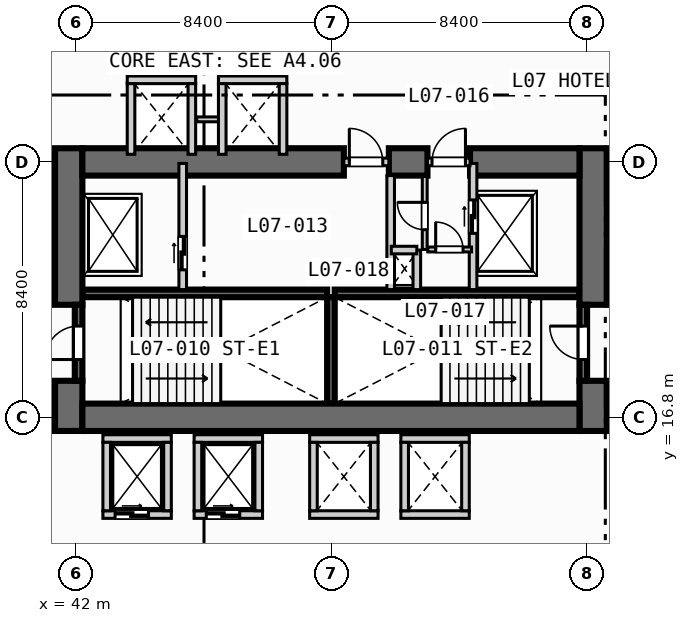
"""IFC4 building model, lengths in metres.
Left out: names, types, materials, properties, quantities, classifications, styles, units other than length and angle.
Written with IfcOpenShell. Run it as: python <this file> out.ifc"""

import sys

from ifc_helpers import new_model, si_unit, direction, frame, frame_2d, origin, place, context, subcontext, project, spatial, rectangle, extrude, element, fill, save


model = new_model("IFC4")
c1 = context("Model", 3, precision=1e-05, world=origin(), true_north=direction((0.0, 1.0)))
c2 = subcontext(c1, "Body", "Model", "MODEL_VIEW")
j1 = project(units=[si_unit("LENGTHUNIT", "METRE"), si_unit("PLANEANGLEUNIT", "RADIAN")], contexts=[c1])
p1 = place(None, origin())
s1 = spatial("IfcSite", under=j1, at=p1, CompositionType="ELEMENT")
p2 = place(p1, origin())
s2 = spatial("IfcBuilding", under=s1, at=p2, CompositionType="ELEMENT")
p3 = place(p2, frame((0.0, 0.0, 35.8)))
s3 = spatial("IfcBuildingStorey", under=s2, at=p3, CompositionType="ELEMENT", Elevation=35.8)
for number, where, z_axis, x_axis in (
    (1, (42.2, 20.875, 0.0), (0.0, 0.0, 1.0), (1.0, 0.0, 0.0)),
    (2, (50.5, 20.875, 0.0), (0.0, 0.0, 1.0), (1.0, 0.0, 0.0)),
):
    element("IfcWall", number, at=place(p3, frame(where, z_axis=z_axis, x_axis=x_axis)), inside=s3, PredefinedType="SOLIDWALL", context=c2, shape_type="SweptSolid", body=[
        extrude(rectangle(XDim=8.05, YDim=0.25, at=frame_2d((4.025, 0.0))), origin(), (0.0, 0.0, 1.0), 3.55),
    ])
p4 = place(p3, frame((50.375, 17.25, 0.0), z_axis=(0.0, 0.0, 1.0), x_axis=(0.0, 1.0, 0.0)))
e3 = element("IfcWall", 3, at=p4, inside=s3, PredefinedType="SOLIDWALL", context=c2, shape_type="SweptSolid", body=[
    extrude(rectangle(XDim=3.5, YDim=0.25, at=frame_2d((1.75, 0.0))), origin(), (0.0, 0.0, 1.0), 3.55),
])
p5 = place(p3, frame((41.75, 16.35, 0.0), z_axis=(0.0, 0.0, 1.0), x_axis=(0.0, 1.0, 0.0)))
e4 = element("IfcWall", 4, at=p5, inside=s3, PredefinedType="SHEAR", context=c2, shape_type="SweptSolid", body=[
    extrude(rectangle(XDim=1.65, YDim=0.9, at=frame_2d((0.825, 0.0))), origin(), (0.0, 0.0, 1.0), 3.55),
])
p6 = place(p3, frame((41.75, 20.5, 0.0), z_axis=(0.0, 0.0, 1.0), x_axis=(0.0, 1.0, 0.0)))
e5 = element("IfcWall", 5, at=p6, inside=s3, PredefinedType="SHEAR", context=c2, shape_type="SweptSolid", body=[
    extrude(rectangle(XDim=5.15, YDim=0.9, at=frame_2d((2.575, 0.0))), origin(), (0.0, 0.0, 1.0), 3.55),
])
p7 = place(p3, frame((59.0, 16.35, 0.0), z_axis=(0.0, 0.0, 1.0), x_axis=(0.0, 1.0, 0.0)))
e6 = element("IfcWall", 6, at=p7, inside=s3, PredefinedType="SHEAR", context=c2, shape_type="SweptSolid", body=[
    extrude(rectangle(XDim=1.65, YDim=0.9, at=frame_2d((0.825, 0.0))), origin(), (0.0, 0.0, 1.0), 3.55),
])
p8 = place(p3, frame((59.0, 20.5, 0.0), z_axis=(0.0, 0.0, 1.0), x_axis=(0.0, 1.0, 0.0)))
e7 = element("IfcWall", 7, at=p8, inside=s3, PredefinedType="SHEAR", context=c2, shape_type="SweptSolid", body=[
    extrude(rectangle(XDim=5.15, YDim=0.9, at=frame_2d((2.575, 0.0))), origin(), (0.0, 0.0, 1.0), 3.55),
])
p9 = place(p3, frame((42.2, 16.8, 0.0), z_axis=(0.0, 0.0, 1.0), x_axis=(1.0, 0.0, 0.0)))
e8 = element("IfcWall", 8, at=p9, inside=s3, PredefinedType="SHEAR", context=c2, shape_type="SweptSolid", body=[
    extrude(rectangle(XDim=16.35, YDim=0.9, at=frame_2d((8.175, 0.0))), origin(), (0.0, 0.0, 1.0), 3.55),
])
p10 = place(p3, frame((42.2, 25.2, 0.0), z_axis=(0.0, 0.0, 1.0), x_axis=(1.0, 0.0, 0.0)))
e9 = element("IfcWall", 9, at=p10, inside=s3, PredefinedType="SHEAR", context=c2, shape_type="SweptSolid", body=[
    extrude(rectangle(XDim=8.6, YDim=0.9, at=frame_2d((4.3, 0.0))), origin(), (0.0, 0.0, 1.0), 3.55),
])
p11 = place(p3, frame((52.28, 25.2, 0.0), z_axis=(0.0, 0.0, 1.0), x_axis=(1.0, 0.0, 0.0)))
e10 = element("IfcWall", 10, at=p11, inside=s3, PredefinedType="SHEAR", context=c2, shape_type="SweptSolid", body=[
    extrude(rectangle(XDim=1.27, YDim=0.9, at=frame_2d((0.635, 0.0))), origin(), (0.0, 0.0, 1.0), 3.55),
])
p12 = place(p3, frame((54.95, 25.2, 0.0), z_axis=(0.0, 0.0, 1.0), x_axis=(1.0, 0.0, 0.0)))
e11 = element("IfcWall", 11, at=p12, inside=s3, PredefinedType="SHEAR", context=c2, shape_type="SweptSolid", body=[
    extrude(rectangle(XDim=3.6, YDim=0.9, at=frame_2d((1.8, 0.0))), origin(), (0.0, 0.0, 1.0), 3.55),
])
p13 = place(p3, frame((42.075, 18.0, 0.0), z_axis=(0.0, 0.0, 1.0), x_axis=(0.0, 1.0, 0.0)))
e12 = element("IfcWall", 12, at=p13, inside=s3, PredefinedType="SOLIDWALL", context=c2, shape_type="SweptSolid", body=[
    extrude(rectangle(XDim=2.5, YDim=0.25, at=frame_2d((1.25, 0.0))), origin(), (0.0, 0.0, 1.0), 3.55),
])
p14 = place(p13, frame((0.7, 0.0, 0.0)))
e13 = element("IfcOpeningElement", 13, at=p14, cuts=e12, PredefinedType="OPENING", context=c2, shape_type="SweptSolid", body=[
    extrude(rectangle(XDim=1.1, YDim=2.15, at=frame_2d((0.55, 1.075))), frame((0.0, 0.135, 0.0), z_axis=(0.0, -1.0, 0.0), x_axis=(1.0, 0.0, 0.0)), (0.0, 0.0, 1.0), 0.27),
])
p15 = place(p3, frame((58.675, 18.0, 0.0), z_axis=(0.0, 0.0, 1.0), x_axis=(0.0, 1.0, 0.0)))
e14 = element("IfcWall", 14, at=p15, inside=s3, PredefinedType="SOLIDWALL", context=c2, shape_type="SweptSolid", body=[
    extrude(rectangle(XDim=2.5, YDim=0.25, at=frame_2d((1.25, 0.0))), origin(), (0.0, 0.0, 1.0), 3.55),
])
p16 = place(p15, frame((0.7, 0.0, 0.0)))
e15 = element("IfcOpeningElement", 15, at=p16, cuts=e14, PredefinedType="OPENING", context=c2, shape_type="SweptSolid", body=[
    extrude(rectangle(XDim=1.1, YDim=2.15, at=frame_2d((0.55, 1.075))), frame((0.0, 0.135, 0.0), z_axis=(0.0, -1.0, 0.0), x_axis=(1.0, 0.0, 0.0)), (0.0, 0.0, 1.0), 0.27),
])
p17 = place(p3, frame((45.5, 21.0, 0.0), z_axis=(0.0, 0.0, 1.0), x_axis=(0.0, 1.0, 0.0)))
e16 = element("IfcWall", 16, at=p17, inside=s3, PredefinedType="SOLIDWALL", context=c2, shape_type="SweptSolid", body=[
    extrude(rectangle(XDim=4.15, YDim=0.25, at=frame_2d((2.075, 0.0))), origin(), (0.0, 0.0, 1.0), 3.55),
])
p18 = place(p17, frame((0.65, 0.0, 0.0)))
e17 = element("IfcOpeningElement", 17, at=p18, cuts=e16, PredefinedType="OPENING", context=c2, shape_type="SweptSolid", body=[
    extrude(rectangle(XDim=1.1, YDim=2.15, at=frame_2d((0.55, 1.075))), frame((0.0, 0.135, 0.0), z_axis=(0.0, -1.0, 0.0), x_axis=(1.0, 0.0, 0.0)), (0.0, 0.0, 1.0), 0.27),
])
p19 = place(p3, frame((50.8, 25.2, 0.0), z_axis=(0.0, 0.0, 1.0), x_axis=(1.0, 0.0, 0.0)))
e18 = element("IfcWall", 18, at=p19, inside=s3, PredefinedType="SOLIDWALL", context=c2, shape_type="SweptSolid", body=[
    extrude(rectangle(XDim=1.48, YDim=0.25, at=frame_2d((0.74, 0.0))), origin(), (0.0, 0.0, 1.0), 3.55),
])
p20 = place(p19, frame((0.18, 0.0, 0.0)))
e19 = element("IfcOpeningElement", 19, at=p20, cuts=e18, PredefinedType="OPENING", context=c2, shape_type="SweptSolid", body=[
    extrude(rectangle(XDim=1.1, YDim=2.15, at=frame_2d((0.55, 1.075))), frame((0.0, 0.135, 0.0), z_axis=(0.0, -1.0, 0.0), x_axis=(1.0, 0.0, 0.0)), (0.0, 0.0, 1.0), 0.27),
])
p21 = place(p3, frame((52.34, 21.0, 0.0), z_axis=(0.0, 0.0, 1.0), x_axis=(0.0, 1.0, 0.0)))
e20 = element("IfcWall", 20, at=p21, inside=s3, PredefinedType="SOLIDWALL", context=c2, shape_type="SweptSolid", body=[
    extrude(rectangle(XDim=3.75, YDim=0.25, at=frame_2d((1.875, 0.0))), origin(), (0.0, 0.0, 1.0), 3.55),
])
p22 = place(p3, frame((55.05, 21.0, 0.0), z_axis=(0.0, 0.0, 1.0), x_axis=(0.0, 1.0, 0.0)))
e21 = element("IfcWall", 21, at=p22, inside=s3, PredefinedType="SOLIDWALL", context=c2, shape_type="SweptSolid", body=[
    extrude(rectangle(XDim=4.15, YDim=0.25, at=frame_2d((2.075, 0.0))), origin(), (0.0, 0.0, 1.0), 3.55),
])
p23 = place(p22, frame((1.85, 0.0, 0.0)))
e22 = element("IfcOpeningElement", 22, at=p23, cuts=e21, PredefinedType="OPENING", context=c2, shape_type="SweptSolid", body=[
    extrude(rectangle(XDim=1.1, YDim=2.15, at=frame_2d((0.55, 1.075))), frame((0.0, 0.135, 0.0), z_axis=(0.0, -1.0, 0.0), x_axis=(1.0, 0.0, 0.0)), (0.0, 0.0, 1.0), 0.27),
])
p24 = place(p3, frame((53.55, 25.2, 0.0), z_axis=(0.0, 0.0, 1.0), x_axis=(1.0, 0.0, 0.0)))
e23 = element("IfcWall", 23, at=p24, inside=s3, PredefinedType="SOLIDWALL", context=c2, shape_type="SweptSolid", body=[
    extrude(rectangle(XDim=1.4, YDim=0.25, at=frame_2d((0.7, 0.0))), origin(), (0.0, 0.0, 1.0), 3.55),
])
p25 = place(p24, frame((0.15, 0.0, 0.0)))
e24 = element("IfcOpeningElement", 24, at=p25, cuts=e23, PredefinedType="OPENING", context=c2, shape_type="SweptSolid", body=[
    extrude(rectangle(XDim=1.1, YDim=2.15, at=frame_2d((0.55, 1.075))), frame((0.0, 0.135, 0.0), z_axis=(0.0, -1.0, 0.0), x_axis=(1.0, 0.0, 0.0)), (0.0, 0.0, 1.0), 0.27),
])
p26 = place(p3, frame((53.2, 21.0, 0.0), z_axis=(0.0, 0.0, 1.0), x_axis=(0.0, 1.0, 0.0)))
e25 = element("IfcWall", 25, at=p26, inside=s3, PredefinedType="SOLIDWALL", context=c2, shape_type="SweptSolid", body=[
    extrude(rectangle(XDim=1.3, YDim=0.25, at=frame_2d((0.65, 0.0))), origin(), (0.0, 0.0, 1.0), 3.55),
])
p27 = place(p3, frame((52.36, 22.3, 0.0), z_axis=(0.0, 0.0, 1.0), x_axis=(1.0, 0.0, 0.0)))
e26 = element("IfcWall", 26, at=p27, inside=s3, PredefinedType="SOLIDWALL", context=c2, shape_type="SweptSolid", body=[
    extrude(rectangle(XDim=0.84, YDim=0.25, at=frame_2d((0.42, 0.0))), origin(), (0.0, 0.0, 1.0), 3.55),
])
p28 = place(p3, frame((53.56, 22.32, 0.0), z_axis=(0.0, 0.0, 1.0), x_axis=(1.0, 0.0, 0.0)))
e27 = element("IfcWall", 27, at=p28, inside=s3, PredefinedType="PARTITIONING", context=c2, shape_type="SweptSolid", body=[
    extrude(rectangle(XDim=1.44, YDim=0.16, at=frame_2d((0.72, 0.0))), origin(), (0.0, 0.0, 1.0), 3.55),
])
p29 = place(p28, frame((0.26, 0.0, 0.0)))
e28 = element("IfcOpeningElement", 28, at=p29, cuts=e27, PredefinedType="OPENING", context=c2, shape_type="SweptSolid", body=[
    extrude(rectangle(XDim=0.9, YDim=2.1, at=frame_2d((0.45, 1.05))), frame((0.0, 0.09, 0.0), z_axis=(0.0, -1.0, 0.0), x_axis=(1.0, 0.0, 0.0)), (0.0, 0.0, 1.0), 0.18),
])
p30 = place(p3, frame((53.46, 22.32, 0.0), z_axis=(0.0, 0.0, 1.0), x_axis=(0.0, 1.0, 0.0)))
e29 = element("IfcWall", 29, at=p30, inside=s3, PredefinedType="PARTITIONING", context=c2, shape_type="SweptSolid", body=[
    extrude(rectangle(XDim=2.4, YDim=0.16, at=frame_2d((1.2, 0.0))), origin(), (0.0, 0.0, 1.0), 3.55),
])
p31 = place(p30, frame((0.65, 0.0, 0.0)))
e30 = element("IfcOpeningElement", 30, at=p31, cuts=e29, PredefinedType="OPENING", context=c2, shape_type="SweptSolid", body=[
    extrude(rectangle(XDim=0.9, YDim=2.1, at=frame_2d((0.45, 1.05))), frame((0.0, 0.09, 0.0), z_axis=(0.0, -1.0, 0.0), x_axis=(1.0, 0.0, 0.0)), (0.0, 0.0, 1.0), 0.18),
])
p32 = place(p3, frame((42.875, 13.6, 0.0), z_axis=(0.0, 0.0, 1.0), x_axis=(1.0, 0.0, 0.0)))
e31 = element("IfcWall", 31, at=p32, inside=s3, PredefinedType="SOLIDWALL", context=c2, shape_type="SweptSolid", body=[
    extrude(rectangle(XDim=2.25, YDim=0.25, at=frame_2d((1.125, 0.0))), origin(), (0.0, 0.0, 1.0), 3.55),
])
p33 = place(p32, frame((0.4, 0.0, 0.0)))
e32 = element("IfcOpeningElement", 32, at=p33, cuts=e31, PredefinedType="OPENING", context=c2, shape_type="SweptSolid", body=[
    extrude(rectangle(XDim=1.1, YDim=2.15, at=frame_2d((0.55, 1.075))), frame((0.0, 0.135, 0.0), z_axis=(0.0, -1.0, 0.0), x_axis=(1.0, 0.0, 0.0)), (0.0, 0.0, 1.0), 0.27),
])
for number, where, z_axis, x_axis in (
    (33, (42.875, 16.1, 0.0), (0.0, 0.0, 1.0), (1.0, 0.0, 0.0)),
    (34, (43.0, 13.725, 0.0), (0.0, 0.0, 1.0), (0.0, 1.0, 0.0)),
    (35, (45.0, 13.725, 0.0), (0.0, 0.0, 1.0), (0.0, 1.0, 0.0)),
):
    element("IfcWall", number, at=place(p3, frame(where, z_axis=z_axis, x_axis=x_axis)), inside=s3, PredefinedType="SOLIDWALL", context=c2, shape_type="SweptSolid", body=[
        extrude(rectangle(XDim=2.25, YDim=0.25, at=frame_2d((1.125, 0.0))), origin(), (0.0, 0.0, 1.0), 3.55),
    ])
p34 = place(p3, frame((45.875, 13.6, 0.0), z_axis=(0.0, 0.0, 1.0), x_axis=(1.0, 0.0, 0.0)))
e36 = element("IfcWall", 36, at=p34, inside=s3, PredefinedType="SOLIDWALL", context=c2, shape_type="SweptSolid", body=[
    extrude(rectangle(XDim=2.25, YDim=0.25, at=frame_2d((1.125, 0.0))), origin(), (0.0, 0.0, 1.0), 3.55),
])
p35 = place(p34, frame((0.4, 0.0, 0.0)))
e37 = element("IfcOpeningElement", 37, at=p35, cuts=e36, PredefinedType="OPENING", context=c2, shape_type="SweptSolid", body=[
    extrude(rectangle(XDim=1.1, YDim=2.15, at=frame_2d((0.55, 1.075))), frame((0.0, 0.135, 0.0), z_axis=(0.0, -1.0, 0.0), x_axis=(1.0, 0.0, 0.0)), (0.0, 0.0, 1.0), 0.27),
])
for number, where, z_axis, x_axis in (
    (38, (45.875, 16.1, 0.0), (0.0, 0.0, 1.0), (1.0, 0.0, 0.0)),
    (39, (46.0, 13.725, 0.0), (0.0, 0.0, 1.0), (0.0, 1.0, 0.0)),
    (40, (48.0, 13.725, 0.0), (0.0, 0.0, 1.0), (0.0, 1.0, 0.0)),
    (41, (49.675, 13.6, 0.0), (0.0, 0.0, 1.0), (1.0, 0.0, 0.0)),
    (42, (49.675, 16.1, 0.0), (0.0, 0.0, 1.0), (1.0, 0.0, 0.0)),
    (43, (49.8, 13.725, 0.0), (0.0, 0.0, 1.0), (0.0, 1.0, 0.0)),
    (44, (51.8, 13.725, 0.0), (0.0, 0.0, 1.0), (0.0, 1.0, 0.0)),
    (45, (52.675, 13.6, 0.0), (0.0, 0.0, 1.0), (1.0, 0.0, 0.0)),
    (46, (52.675, 16.1, 0.0), (0.0, 0.0, 1.0), (1.0, 0.0, 0.0)),
    (47, (52.8, 13.725, 0.0), (0.0, 0.0, 1.0), (0.0, 1.0, 0.0)),
    (48, (54.8, 13.725, 0.0), (0.0, 0.0, 1.0), (0.0, 1.0, 0.0)),
    (49, (43.675, 27.9, 0.0), (0.0, 0.0, 1.0), (1.0, 0.0, 0.0)),
):
    element("IfcWall", number, at=place(p3, frame(where, z_axis=z_axis, x_axis=x_axis)), inside=s3, PredefinedType="SOLIDWALL", context=c2, shape_type="SweptSolid", body=[
        extrude(rectangle(XDim=2.25, YDim=0.25, at=frame_2d((1.125, 0.0))), origin(), (0.0, 0.0, 1.0), 3.55),
    ])
for number, where, z_axis, x_axis in (
    (50, (43.8, 25.45, 0.0), (0.0, 0.0, 1.0), (0.0, 1.0, 0.0)),
    (51, (45.8, 25.45, 0.0), (0.0, 0.0, 1.0), (0.0, 1.0, 0.0)),
):
    element("IfcWall", number, at=place(p3, frame(where, z_axis=z_axis, x_axis=x_axis)), inside=s3, PredefinedType="SOLIDWALL", context=c2, shape_type="SweptSolid", body=[
        extrude(rectangle(XDim=2.325, YDim=0.25, at=frame_2d((1.163, 0.0))), origin(), (0.0, 0.0, 1.0), 3.55),
    ])
p36 = place(p3, frame((45.96, 26.6, 0.0), z_axis=(0.0, 0.0, 1.0), x_axis=(1.0, 0.0, 0.0)))
e52 = element("IfcWall", 52, at=p36, inside=s3, PredefinedType="PARTITIONING", context=c2, shape_type="SweptSolid", body=[
    extrude(rectangle(XDim=0.88, YDim=0.16, at=frame_2d((0.44, 0.0))), origin(), (0.0, 0.0, 1.0), 3.55),
])
p37 = place(p3, frame((46.675, 27.9, 0.0), z_axis=(0.0, 0.0, 1.0), x_axis=(1.0, 0.0, 0.0)))
e53 = element("IfcWall", 53, at=p37, inside=s3, PredefinedType="SOLIDWALL", context=c2, shape_type="SweptSolid", body=[
    extrude(rectangle(XDim=2.25, YDim=0.25, at=frame_2d((1.125, 0.0))), origin(), (0.0, 0.0, 1.0), 3.55),
])
for number, where, z_axis, x_axis in (
    (54, (46.8, 25.45, 0.0), (0.0, 0.0, 1.0), (0.0, 1.0, 0.0)),
    (55, (48.8, 25.45, 0.0), (0.0, 0.0, 1.0), (0.0, 1.0, 0.0)),
):
    element("IfcWall", number, at=place(p3, frame(where, z_axis=z_axis, x_axis=x_axis)), inside=s3, PredefinedType="SOLIDWALL", context=c2, shape_type="SweptSolid", body=[
        extrude(rectangle(XDim=2.325, YDim=0.25, at=frame_2d((1.163, 0.0))), origin(), (0.0, 0.0, 1.0), 3.55),
    ])
p38 = place(p14, origin())
e56 = element("IfcDoor", 56, at=p38, inside=s3, OperationType="SINGLE_SWING_LEFT", PredefinedType="DOOR", context=c2, shape_type="SweptSolid", body=[
    extrude(rectangle(XDim=1.1, YDim=2.15, at=frame_2d((0.55, 1.075))), frame((0.0, 0.025, 0.0), z_axis=(0.0, -1.0, 0.0), x_axis=(1.0, 0.0, 0.0)), (0.0, 0.0, 1.0), 0.05),
])
fill(e13, e56)
p39 = place(p16, origin())
e57 = element("IfcDoor", 57, at=p39, inside=s3, OperationType="SINGLE_SWING_RIGHT", PredefinedType="DOOR", context=c2, shape_type="SweptSolid", body=[
    extrude(rectangle(XDim=1.1, YDim=2.15, at=frame_2d((0.55, 1.075))), frame((0.0, 0.025, 0.0), z_axis=(0.0, -1.0, 0.0), x_axis=(1.0, 0.0, 0.0)), (0.0, 0.0, 1.0), 0.05),
])
fill(e15, e57)
p40 = place(p18, origin())
e58 = element("IfcDoor", 58, at=p40, inside=s3, OperationType="SLIDING_TO_LEFT", PredefinedType="DOOR", context=c2, shape_type="SweptSolid", body=[
    extrude(rectangle(XDim=1.1, YDim=2.15, at=frame_2d((0.55, 1.075))), frame((0.0, 0.025, 0.0), z_axis=(0.0, -1.0, 0.0), x_axis=(1.0, 0.0, 0.0)), (0.0, 0.0, 1.0), 0.05),
])
fill(e17, e58)
p41 = place(p20, origin())
e59 = element("IfcDoor", 59, at=p41, inside=s3, OperationType="SINGLE_SWING_LEFT", PredefinedType="DOOR", context=c2, shape_type="SweptSolid", body=[
    extrude(rectangle(XDim=1.1, YDim=2.15, at=frame_2d((0.55, 1.075))), frame((0.0, 0.025, 0.0), z_axis=(0.0, -1.0, 0.0), x_axis=(1.0, 0.0, 0.0)), (0.0, 0.0, 1.0), 0.05),
])
fill(e19, e59)
p42 = place(p23, origin())
e60 = element("IfcDoor", 60, at=p42, inside=s3, OperationType="SLIDING_TO_LEFT", PredefinedType="DOOR", context=c2, shape_type="SweptSolid", body=[
    extrude(rectangle(XDim=1.1, YDim=2.15, at=frame_2d((0.55, 1.075))), frame((0.0, 0.025, 0.0), z_axis=(0.0, -1.0, 0.0), x_axis=(1.0, 0.0, 0.0)), (0.0, 0.0, 1.0), 0.05),
])
fill(e22, e60)
p43 = place(p25, origin())
e61 = element("IfcDoor", 61, at=p43, inside=s3, OperationType="SINGLE_SWING_RIGHT", PredefinedType="DOOR", context=c2, shape_type="SweptSolid", body=[
    extrude(rectangle(XDim=1.1, YDim=2.15, at=frame_2d((0.55, 1.075))), frame((0.0, 0.025, 0.0), z_axis=(0.0, -1.0, 0.0), x_axis=(1.0, 0.0, 0.0)), (0.0, 0.0, 1.0), 0.05),
])
fill(e24, e61)
p44 = place(p29, origin())
e62 = element("IfcDoor", 62, at=p44, inside=s3, OperationType="SINGLE_SWING_LEFT", PredefinedType="DOOR", context=c2, shape_type="SweptSolid", body=[
    extrude(rectangle(XDim=0.9, YDim=2.1, at=frame_2d((0.45, 1.05))), frame((0.0, 0.025, 0.0), z_axis=(0.0, -1.0, 0.0), x_axis=(1.0, 0.0, 0.0)), (0.0, 0.0, 1.0), 0.05),
])
fill(e28, e62)
p45 = place(p31, origin())
e63 = element("IfcDoor", 63, at=p45, inside=s3, OperationType="SINGLE_SWING_RIGHT", PredefinedType="DOOR", context=c2, shape_type="SweptSolid", body=[
    extrude(rectangle(XDim=0.9, YDim=2.1, at=frame_2d((0.45, 1.05))), frame((0.0, 0.025, 0.0), z_axis=(0.0, -1.0, 0.0), x_axis=(1.0, 0.0, 0.0)), (0.0, 0.0, 1.0), 0.05),
])
fill(e30, e63)
p46 = place(p33, origin())
e64 = element("IfcDoor", 64, at=p46, inside=s3, OperationType="SLIDING_TO_LEFT", PredefinedType="DOOR", context=c2, shape_type="SweptSolid", body=[
    extrude(rectangle(XDim=1.1, YDim=2.15, at=frame_2d((0.55, 1.075))), frame((0.0, 0.025, 0.0), z_axis=(0.0, -1.0, 0.0), x_axis=(1.0, 0.0, 0.0)), (0.0, 0.0, 1.0), 0.05),
])
fill(e32, e64)
p47 = place(p35, origin())
e65 = element("IfcDoor", 65, at=p47, inside=s3, OperationType="SLIDING_TO_LEFT", PredefinedType="DOOR", context=c2, shape_type="SweptSolid", body=[
    extrude(rectangle(XDim=1.1, YDim=2.15, at=frame_2d((0.55, 1.075))), frame((0.0, 0.025, 0.0), z_axis=(0.0, -1.0, 0.0), x_axis=(1.0, 0.0, 0.0)), (0.0, 0.0, 1.0), 0.05),
])
fill(e37, e65)
save(model, sys.argv[1])
